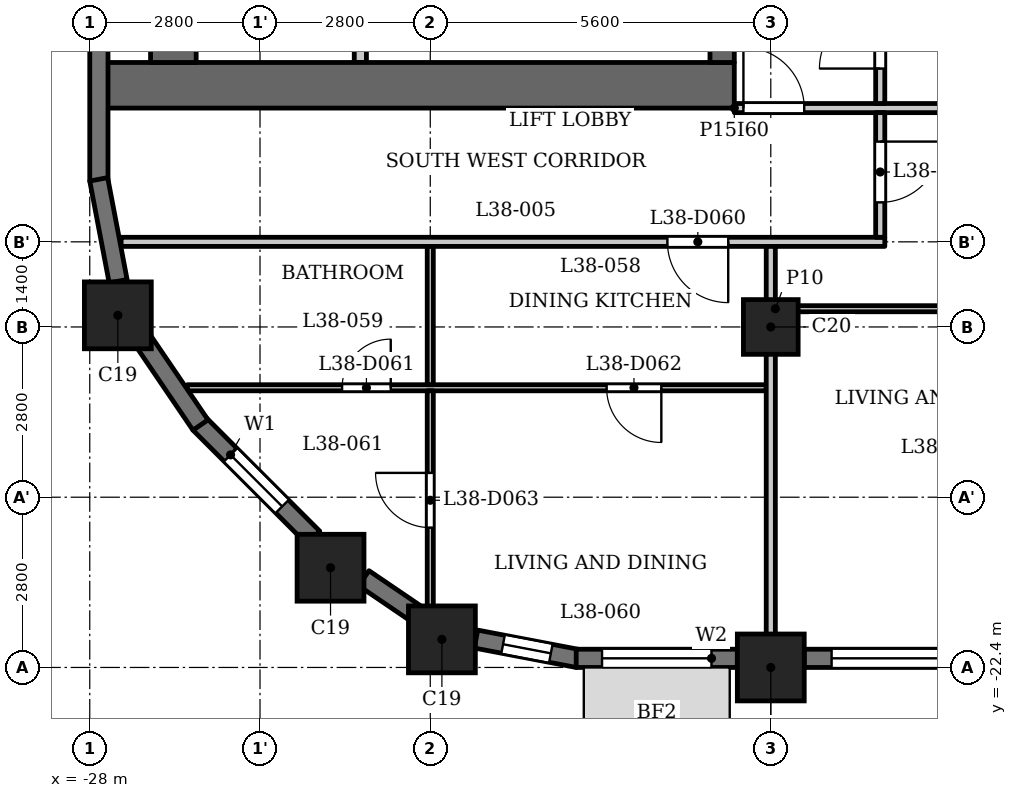
"""IFC4 building model, lengths in metres.
Left out: names, types, materials, properties, quantities, classifications, styles, units other than length and angle.
Written with IfcOpenShell. Run it as: python <this file> out.ifc"""

import sys

from ifc_helpers import new_model, si_unit, direction, frame, frame_2d, origin, origin_2d, place, context, subcontext, project, spatial, rectangle, extrude, element, fill, save


model = new_model("IFC4")
c1 = context("Model", 3, precision=1e-05, world=origin(), true_north=direction((0.0, 1.0)))
c2 = subcontext(c1, "Body", "Model", "MODEL_VIEW")
j1 = project(units=[si_unit("LENGTHUNIT", "METRE"), si_unit("PLANEANGLEUNIT", "RADIAN")], contexts=[c1])
p1 = place(None, origin())
s1 = spatial("IfcSite", under=j1, at=p1, CompositionType="ELEMENT")
p2 = place(p1, origin())
s2 = spatial("IfcBuilding", under=s1, at=p2, CompositionType="ELEMENT")
p3 = place(p2, frame((0.0, 0.0, 150.1)))
s3 = spatial("IfcBuildingStorey", under=s2, at=p3, CompositionType="ELEMENT", Elevation=150.1)
for number, where, z_axis, x_axis in (
    (1, (-22.209, -21.938, 0.0), (0.0, 0.0, 1.0), (1.0, 0.0, 0.0)),
    (2, (-16.8, -22.4, 0.0), (0.0, 0.0, 1.0), (1.0, 0.0, 0.0)),
    (3, (-27.538, -16.609, 0.0), (0.0, 0.0, 1.0), (1.0, 0.0, 0.0)),
    (4, (-24.04, -20.76, 0.0), (0.0, 0.0, 1.0), (1.0, 0.0, 0.0)),
):
    element("IfcColumn", number, at=place(p3, frame(where, z_axis=z_axis, x_axis=x_axis)), inside=s3, PredefinedType="COLUMN", context=c2, shape_type="SweptSolid", body=[
        extrude(rectangle(XDim=1.1, YDim=1.1, at=origin_2d()), origin(), (0.0, 0.0, 1.0), 3.5),
    ])
p4 = place(p3, frame((-16.8, -16.8, 0.0), z_axis=(0.0, 0.0, 1.0), x_axis=(1.0, 0.0, 0.0)))
e5 = element("IfcColumn", 5, at=p4, inside=s3, PredefinedType="COLUMN", context=c2, shape_type="SweptSolid", body=[
    extrude(rectangle(XDim=0.9, YDim=0.9, at=origin_2d()), origin(), (0.0, 0.0, 1.0), 3.5),
])
p5 = place(p3, frame((-26.197, -18.391, 0.0), z_axis=(0.0, 0.0, 1.0), x_axis=(0.707060717099, -0.707152842274, 0.0)))
e6 = element("IfcWall", 6, at=p5, inside=s3, PredefinedType="SOLIDWALL", context=c2, shape_type="SweptSolid", body=[
    extrude(rectangle(XDim=2.65, YDim=0.3, at=frame_2d((1.325, 0.0))), origin(), (0.0, 0.0, 1.0), 2.45),
])
p6 = place(p5, frame((0.725, 0.0, 0.6)))
e7 = element("IfcOpeningElement", 7, at=p6, cuts=e6, PredefinedType="OPENING", context=c2, shape_type="SweptSolid", body=[
    extrude(rectangle(XDim=1.2, YDim=1.55, at=frame_2d((0.6, 0.775))), frame((0.0, 0.16, 0.0), z_axis=(0.0, -1.0, 0.0), x_axis=(1.0, 0.0, 0.0)), (0.0, 0.0, 1.0), 0.32),
])
p7 = place(p3, frame((-23.492, -20.932, 0.0), z_axis=(0.0, 0.0, 1.0), x_axis=(0.826993959827, -0.562210806023, 0.0)))
e8 = element("IfcWall", 8, at=p7, inside=s3, PredefinedType="SOLIDWALL", context=c2, shape_type="SweptSolid", body=[
    extrude(rectangle(XDim=1.077, YDim=0.3, at=frame_2d((0.539, 0.0))), origin(), (0.0, 0.0, 1.0), 3.2),
])
p8 = place(p3, frame((-21.648, -21.933, 0.0), z_axis=(0.0, 0.0, 1.0), x_axis=(0.982297206936, -0.187329114784, 0.0)))
e9 = element("IfcWall", 9, at=p8, inside=s3, PredefinedType="SOLIDWALL", context=c2, shape_type="SweptSolid", body=[
    extrude(rectangle(XDim=1.706, YDim=0.3, at=frame_2d((0.853, 0.0))), origin(), (0.0, 0.0, 1.0), 2.45),
])
p9 = place(p8, frame((0.453, 0.0, 0.6)))
e10 = element("IfcOpeningElement", 10, at=p9, cuts=e9, PredefinedType="OPENING", context=c2, shape_type="SweptSolid", body=[
    extrude(rectangle(XDim=0.8, YDim=1.55, at=frame_2d((0.4, 0.775))), frame((0.0, 0.16, 0.0), z_axis=(0.0, -1.0, 0.0), x_axis=(1.0, 0.0, 0.0)), (0.0, 0.0, 1.0), 0.32),
])
p10 = place(p3, frame((-20.0, -22.25, 0.0), z_axis=(0.0, 0.0, 1.0), x_axis=(1.0, 0.0, 0.0)))
e11 = element("IfcWall", 11, at=p10, inside=s3, PredefinedType="SOLIDWALL", context=c2, shape_type="SweptSolid", body=[
    extrude(rectangle(XDim=2.65, YDim=0.3, at=frame_2d((1.325, 0.0))), origin(), (0.0, 0.0, 1.0), 2.45),
])
p11 = place(p10, frame((0.425, 0.0, 0.9)))
e12 = element("IfcOpeningElement", 12, at=p11, cuts=e11, PredefinedType="OPENING", context=c2, shape_type="SweptSolid", body=[
    extrude(rectangle(XDim=1.8, YDim=1.25, at=frame_2d((0.9, 0.625))), frame((0.0, 0.16, 0.0), z_axis=(0.0, -1.0, 0.0), x_axis=(1.0, 0.0, 0.0)), (0.0, 0.0, 1.0), 0.32),
])
p12 = place(p3, frame((-16.25, -22.25, 0.0), z_axis=(0.0, 0.0, 1.0), x_axis=(1.0, 0.0, 0.0)))
e13 = element("IfcWall", 13, at=p12, inside=s3, PredefinedType="SOLIDWALL", context=c2, shape_type="SweptSolid", body=[
    extrude(rectangle(XDim=4.5, YDim=0.3, at=frame_2d((2.25, 0.0))), origin(), (0.0, 0.0, 1.0), 2.45),
])
p13 = place(p12, frame((0.45, 0.0, 1.2)))
e14 = element("IfcOpeningElement", 14, at=p13, cuts=e13, PredefinedType="OPENING", context=c2, shape_type="SweptSolid", body=[
    extrude(rectangle(XDim=3.6, YDim=0.95, at=frame_2d((1.8, 0.475))), frame((0.0, 0.16, 0.0), z_axis=(0.0, -1.0, 0.0), x_axis=(1.0, 0.0, 0.0)), (0.0, 0.0, 1.0), 0.32),
])
p14 = place(p3, frame((-27.85, -11.75, 0.0), z_axis=(0.0, 0.0, 1.0), x_axis=(0.0, -1.0, 0.0)))
e15 = element("IfcWall", 15, at=p14, inside=s3, PredefinedType="SOLIDWALL", context=c2, shape_type="SweptSolid", body=[
    extrude(rectangle(XDim=2.65, YDim=0.3, at=frame_2d((1.325, 0.0))), origin(), (0.0, 0.0, 1.0), 2.45),
])
p15 = place(p3, frame((-27.853, -14.372, 0.0), z_axis=(0.0, 0.0, 1.0), x_axis=(0.187302784601, -0.982302227871, 0.0)))
e16 = element("IfcWall", 16, at=p15, inside=s3, PredefinedType="SOLIDWALL", context=c2, shape_type="SweptSolid", body=[
    extrude(rectangle(XDim=1.706, YDim=0.3, at=frame_2d((0.853, 0.0))), origin(), (0.0, 0.0, 1.0), 2.45),
])
p16 = place(p3, frame((-27.138, -17.002, 0.0), z_axis=(0.0, 0.0, 1.0), x_axis=(0.562075160946, -0.827086158419, 0.0)))
e17 = element("IfcWall", 17, at=p16, inside=s3, PredefinedType="SOLIDWALL", context=c2, shape_type="SweptSolid", body=[
    extrude(rectangle(XDim=1.706, YDim=0.3, at=frame_2d((0.853, 0.0))), origin(), (0.0, 0.0, 1.0), 2.45),
])
p17 = place(p3, frame((-17.4, -12.825, 0.0), z_axis=(0.0, 0.0, 1.0), x_axis=(-1.0, 0.0, 0.0)))
e18 = element("IfcWall", 18, at=p17, inside=s3, PredefinedType="SHEAR", context=c2, shape_type="SweptSolid", body=[
    extrude(rectangle(XDim=10.4, YDim=0.75, at=frame_2d((5.2, 0.0))), origin(), (0.0, 0.0, 1.0), 3.2),
])
p18 = place(p3, frame((-17.6, -12.45, 0.0), z_axis=(0.0, 0.0, 1.0), x_axis=(0.0, 1.0, 0.0)))
e19 = element("IfcWall", 19, at=p18, inside=s3, PredefinedType="SHEAR", context=c2, shape_type="SweptSolid", body=[
    extrude(rectangle(XDim=24.9, YDim=0.4, at=frame_2d((12.45, 0.0))), origin(), (0.0, 0.0, 1.0), 3.2),
])
p19 = place(p18, frame((6.325, 0.0, 0.0)))
e20 = element("IfcOpeningElement", 20, at=p19, cuts=e19, PredefinedType="OPENING", context=c2, shape_type="SweptSolid", body=[
    extrude(rectangle(XDim=0.9, YDim=2.1, at=frame_2d((0.45, 1.05))), frame((0.0, 0.21, 0.0), z_axis=(0.0, -1.0, 0.0), x_axis=(1.0, 0.0, 0.0)), (0.0, 0.0, 1.0), 0.42),
])
p20 = place(p18, frame((9.925, 0.0, 0.0)))
e21 = element("IfcOpeningElement", 21, at=p20, cuts=e19, PredefinedType="OPENING", context=c2, shape_type="SweptSolid", body=[
    extrude(rectangle(XDim=0.9, YDim=2.1, at=frame_2d((0.45, 1.05))), frame((0.0, 0.21, 0.0), z_axis=(0.0, -1.0, 0.0), x_axis=(1.0, 0.0, 0.0)), (0.0, 0.0, 1.0), 0.42),
])
p21 = place(p18, frame((15.6, 0.0, 0.0)))
e22 = element("IfcOpeningElement", 22, at=p21, cuts=e19, PredefinedType="OPENING", context=c2, shape_type="SweptSolid", body=[
    extrude(rectangle(XDim=1.1, YDim=2.1, at=frame_2d((0.55, 1.05))), frame((0.0, 0.21, 0.0), z_axis=(0.0, -1.0, 0.0), x_axis=(1.0, 0.0, 0.0)), (0.0, 0.0, 1.0), 0.42),
])
p22 = place(p18, frame((18.0, 0.0, 0.0)))
e23 = element("IfcOpeningElement", 23, at=p22, cuts=e19, PredefinedType="OPENING", context=c2, shape_type="SweptSolid", body=[
    extrude(rectangle(XDim=1.1, YDim=2.1, at=frame_2d((0.55, 1.05))), frame((0.0, 0.21, 0.0), z_axis=(0.0, -1.0, 0.0), x_axis=(1.0, 0.0, 0.0)), (0.0, 0.0, 1.0), 0.42),
])
p23 = place(p18, frame((23.025, 0.0, 0.0)))
e24 = element("IfcOpeningElement", 24, at=p23, cuts=e19, PredefinedType="OPENING", context=c2, shape_type="SweptSolid", body=[
    extrude(rectangle(XDim=1.1, YDim=2.1, at=frame_2d((0.55, 1.05))), frame((0.0, 0.21, 0.0), z_axis=(0.0, -1.0, 0.0), x_axis=(1.0, 0.0, 0.0)), (0.0, 0.0, 1.0), 0.42),
])
p24 = place(p18, frame((0.775, 0.0, 0.0)))
e25 = element("IfcOpeningElement", 25, at=p24, cuts=e19, PredefinedType="OPENING", context=c2, shape_type="SweptSolid", body=[
    extrude(rectangle(XDim=1.1, YDim=2.1, at=frame_2d((0.55, 1.05))), frame((0.0, 0.21, 0.0), z_axis=(0.0, -1.0, 0.0), x_axis=(1.0, 0.0, 0.0)), (0.0, 0.0, 1.0), 0.42),
])
p25 = place(p18, frame((12.925, 0.0, 0.0)))
e26 = element("IfcOpeningElement", 26, at=p25, cuts=e19, PredefinedType="OPENING", context=c2, shape_type="SweptSolid", body=[
    extrude(rectangle(XDim=1.8, YDim=2.1, at=frame_2d((0.9, 1.05))), frame((0.0, 0.21, 0.0), z_axis=(0.0, -1.0, 0.0), x_axis=(1.0, 0.0, 0.0)), (0.0, 0.0, 1.0), 0.42),
])
p26 = place(p3, frame((-26.625, -12.45, 0.0), z_axis=(0.0, 0.0, 1.0), x_axis=(0.0, 1.0, 0.0)))
e27 = element("IfcWall", 27, at=p26, inside=s3, PredefinedType="SHEAR", context=c2, shape_type="SweptSolid", body=[
    extrude(rectangle(XDim=24.9, YDim=0.75, at=frame_2d((12.45, 0.0))), origin(), (0.0, 0.0, 1.0), 3.2),
])
p27 = place(p3, frame((-23.55, -12.45, 0.0), z_axis=(0.0, 0.0, 1.0), x_axis=(0.0, 1.0, 0.0)))
e28 = element("IfcWall", 28, at=p27, inside=s3, PredefinedType="PARTITIONING", context=c2, shape_type="SweptSolid", body=[
    extrude(rectangle(XDim=2.65, YDim=0.2, at=frame_2d((1.325, 0.0))), origin(), (0.0, 0.0, 1.0), 3.2),
])
p28 = place(p27, frame((0.875, 0.0, 0.0)))
e29 = element("IfcOpeningElement", 29, at=p28, cuts=e28, PredefinedType="OPENING", context=c2, shape_type="SweptSolid", body=[
    extrude(rectangle(XDim=0.9, YDim=2.1, at=frame_2d((0.45, 1.05))), frame((0.0, 0.11, 0.0), z_axis=(0.0, -1.0, 0.0), x_axis=(1.0, 0.0, 0.0)), (0.0, 0.0, 1.0), 0.22),
])
p29 = place(p3, frame((-26.394, -17.8, 0.0), z_axis=(0.0, 0.0, 1.0), x_axis=(1.0, 0.0, 0.0)))
e30 = element("IfcWall", 30, at=p29, inside=s3, PredefinedType="PARTITIONING", context=c2, shape_type="SweptSolid", body=[
    extrude(rectangle(XDim=9.519, YDim=0.1, at=frame_2d((4.76, 0.0))), origin(), (0.0, 0.0, 1.0), 3.2),
])
p30 = place(p29, frame((2.544, 0.0, 0.0)))
e31 = element("IfcOpeningElement", 31, at=p30, cuts=e30, PredefinedType="OPENING", context=c2, shape_type="SweptSolid", body=[
    extrude(rectangle(XDim=0.8, YDim=2.1, at=frame_2d((0.4, 1.05))), frame((0.0, 0.06, 0.0), z_axis=(0.0, -1.0, 0.0), x_axis=(1.0, 0.0, 0.0)), (0.0, 0.0, 1.0), 0.12),
])
p31 = place(p29, frame((6.894, 0.0, 0.0)))
e32 = element("IfcOpeningElement", 32, at=p31, cuts=e30, PredefinedType="OPENING", context=c2, shape_type="SweptSolid", body=[
    extrude(rectangle(XDim=0.9, YDim=2.1, at=frame_2d((0.45, 1.05))), frame((0.0, 0.06, 0.0), z_axis=(0.0, -1.0, 0.0), x_axis=(1.0, 0.0, 0.0)), (0.0, 0.0, 1.0), 0.12),
])
p32 = place(p3, frame((-16.725, -16.5, 0.0), z_axis=(0.0, 0.0, 1.0), x_axis=(1.0, 0.0, 0.0)))
e33 = element("IfcWall", 33, at=p32, inside=s3, PredefinedType="PARTITIONING", context=c2, shape_type="SweptSolid", body=[
    extrude(rectangle(XDim=33.45, YDim=0.1, at=frame_2d((16.725, 0.0))), origin(), (0.0, 0.0, 1.0), 3.2),
])
p33 = place(p32, frame((9.675, 0.0, 0.0)))
e34 = element("IfcOpeningElement", 34, at=p33, cuts=e33, PredefinedType="OPENING", context=c2, shape_type="SweptSolid", body=[
    extrude(rectangle(XDim=0.8, YDim=2.1, at=frame_2d((0.4, 1.05))), frame((0.0, 0.06, 0.0), z_axis=(0.0, -1.0, 0.0), x_axis=(1.0, 0.0, 0.0)), (0.0, 0.0, 1.0), 0.12),
])
p34 = place(p32, frame((4.075, 0.0, 0.0)))
e35 = element("IfcOpeningElement", 35, at=p34, cuts=e33, PredefinedType="OPENING", context=c2, shape_type="SweptSolid", body=[
    extrude(rectangle(XDim=0.9, YDim=2.1, at=frame_2d((0.45, 1.05))), frame((0.0, 0.06, 0.0), z_axis=(0.0, -1.0, 0.0), x_axis=(1.0, 0.0, 0.0)), (0.0, 0.0, 1.0), 0.12),
])
p35 = place(p32, frame((20.875, 0.0, 0.0)))
e36 = element("IfcOpeningElement", 36, at=p35, cuts=e33, PredefinedType="OPENING", context=c2, shape_type="SweptSolid", body=[
    extrude(rectangle(XDim=0.8, YDim=2.1, at=frame_2d((0.4, 1.05))), frame((0.0, 0.06, 0.0), z_axis=(0.0, -1.0, 0.0), x_axis=(1.0, 0.0, 0.0)), (0.0, 0.0, 1.0), 0.12),
])
p36 = place(p32, frame((15.275, 0.0, 0.0)))
e37 = element("IfcOpeningElement", 37, at=p36, cuts=e33, PredefinedType="OPENING", context=c2, shape_type="SweptSolid", body=[
    extrude(rectangle(XDim=0.9, YDim=2.1, at=frame_2d((0.45, 1.05))), frame((0.0, 0.06, 0.0), z_axis=(0.0, -1.0, 0.0), x_axis=(1.0, 0.0, 0.0)), (0.0, 0.0, 1.0), 0.12),
])
p37 = place(p32, frame((26.475, 0.0, 0.0)))
e38 = element("IfcOpeningElement", 38, at=p37, cuts=e33, PredefinedType="OPENING", context=c2, shape_type="SweptSolid", body=[
    extrude(rectangle(XDim=0.8, YDim=2.1, at=frame_2d((0.4, 1.05))), frame((0.0, 0.06, 0.0), z_axis=(0.0, -1.0, 0.0), x_axis=(1.0, 0.0, 0.0)), (0.0, 0.0, 1.0), 0.12),
])
p38 = place(p32, frame((30.575, 0.0, 0.0)))
e39 = element("IfcOpeningElement", 39, at=p38, cuts=e33, PredefinedType="OPENING", context=c2, shape_type="SweptSolid", body=[
    extrude(rectangle(XDim=0.9, YDim=2.1, at=frame_2d((0.45, 1.05))), frame((0.0, 0.06, 0.0), z_axis=(0.0, -1.0, 0.0), x_axis=(1.0, 0.0, 0.0)), (0.0, 0.0, 1.0), 0.12),
])
p39 = place(p3, frame((-27.484, -15.4, 0.0), z_axis=(0.0, 0.0, 1.0), x_axis=(1.0, 0.0, 0.0)))
e40 = element("IfcWall", 40, at=p39, inside=s3, PredefinedType="PARTITIONING", context=c2, shape_type="SweptSolid", body=[
    extrude(rectangle(XDim=12.559, YDim=0.15, at=frame_2d((6.279, 0.0))), origin(), (0.0, 0.0, 1.0), 3.2),
])
p40 = place(p39, frame((8.984, 0.0, 0.0)))
e41 = element("IfcOpeningElement", 41, at=p40, cuts=e40, PredefinedType="OPENING", context=c2, shape_type="SweptSolid", body=[
    extrude(rectangle(XDim=1.0, YDim=2.1, at=frame_2d((0.5, 1.05))), frame((0.0, 0.085, 0.0), z_axis=(0.0, -1.0, 0.0), x_axis=(1.0, 0.0, 0.0)), (0.0, 0.0, 1.0), 0.17),
])
p41 = place(p3, frame((-17.4, -13.2, 0.0), z_axis=(0.0, 0.0, 1.0), x_axis=(1.0, 0.0, 0.0)))
e42 = element("IfcWall", 42, at=p41, inside=s3, PredefinedType="PARTITIONING", context=c2, shape_type="SweptSolid", body=[
    extrude(rectangle(XDim=34.8, YDim=0.15, at=frame_2d((17.4, 0.0))), origin(), (0.0, 0.0, 1.0), 3.2),
])
p42 = place(p41, frame((0.15, 0.0, 0.0)))
e43 = element("IfcOpeningElement", 43, at=p42, cuts=e42, PredefinedType="OPENING", context=c2, shape_type="SweptSolid", body=[
    extrude(rectangle(XDim=1.0, YDim=2.1, at=frame_2d((0.5, 1.05))), frame((0.0, 0.085, 0.0), z_axis=(0.0, -1.0, 0.0), x_axis=(1.0, 0.0, 0.0)), (0.0, 0.0, 1.0), 0.17),
])
p43 = place(p41, frame((33.55, 0.0, 0.0)))
e44 = element("IfcOpeningElement", 44, at=p43, cuts=e42, PredefinedType="OPENING", context=c2, shape_type="SweptSolid", body=[
    extrude(rectangle(XDim=1.0, YDim=2.1, at=frame_2d((0.5, 1.05))), frame((0.0, 0.085, 0.0), z_axis=(0.0, -1.0, 0.0), x_axis=(1.0, 0.0, 0.0)), (0.0, 0.0, 1.0), 0.17),
])
p44 = place(p41, frame((15.7, 0.0, 0.0)))
e45 = element("IfcOpeningElement", 45, at=p44, cuts=e42, PredefinedType="OPENING", context=c2, shape_type="SweptSolid", body=[
    extrude(rectangle(XDim=1.0, YDim=2.1, at=frame_2d((0.5, 1.05))), frame((0.0, 0.085, 0.0), z_axis=(0.0, -1.0, 0.0), x_axis=(1.0, 0.0, 0.0)), (0.0, 0.0, 1.0), 0.17),
])
p45 = place(p3, frame((-22.4, -21.72, 0.0), z_axis=(0.0, 0.0, 1.0), x_axis=(0.0, 1.0, 0.0)))
e46 = element("IfcWall", 46, at=p45, inside=s3, PredefinedType="PARTITIONING", context=c2, shape_type="SweptSolid", body=[
    extrude(rectangle(XDim=3.87, YDim=0.1, at=frame_2d((1.935, 0.0))), origin(), (0.0, 0.0, 1.0), 3.2),
])
p46 = place(p45, frame((1.62, 0.0, 0.0)))
e47 = element("IfcOpeningElement", 47, at=p46, cuts=e46, PredefinedType="OPENING", context=c2, shape_type="SweptSolid", body=[
    extrude(rectangle(XDim=0.9, YDim=2.1, at=frame_2d((0.45, 1.05))), frame((0.0, 0.06, 0.0), z_axis=(0.0, -1.0, 0.0), x_axis=(1.0, 0.0, 0.0)), (0.0, 0.0, 1.0), 0.12),
])
p47 = place(p3, frame((-22.4, -17.75, 0.0), z_axis=(0.0, 0.0, 1.0), x_axis=(0.0, 1.0, 0.0)))
e48 = element("IfcWall", 48, at=p47, inside=s3, PredefinedType="PARTITIONING", context=c2, shape_type="SweptSolid", body=[
    extrude(rectangle(XDim=2.275, YDim=0.1, at=frame_2d((1.137, 0.0))), origin(), (0.0, 0.0, 1.0), 3.2),
])
p48 = place(p3, frame((-16.8, -22.93, 0.0), z_axis=(0.0, 0.0, 1.0), x_axis=(0.0, 1.0, 0.0)))
e49 = element("IfcWall", 49, at=p48, inside=s3, PredefinedType="PARTITIONING", context=c2, shape_type="SweptSolid", body=[
    extrude(rectangle(XDim=7.455, YDim=0.15, at=frame_2d((3.728, 0.0))), origin(), (0.0, 0.0, 1.0), 3.2),
])
p49 = place(p3, frame((-15.0, -15.325, 0.0), z_axis=(0.0, 0.0, 1.0), x_axis=(0.0, 1.0, 0.0)))
e50 = element("IfcWall", 50, at=p49, inside=s3, PredefinedType="PARTITIONING", context=c2, shape_type="SweptSolid", body=[
    extrude(rectangle(XDim=2.05, YDim=0.15, at=frame_2d((1.025, 0.0))), origin(), (0.0, 0.0, 1.0), 3.2),
])
p50 = place(p49, frame((0.574, 0.0, 0.0)))
e51 = element("IfcOpeningElement", 51, at=p50, cuts=e50, PredefinedType="OPENING", context=c2, shape_type="SweptSolid", body=[
    extrude(rectangle(XDim=1.0, YDim=2.1, at=frame_2d((0.5, 1.05))), frame((0.0, 0.085, 0.0), z_axis=(0.0, -1.0, 0.0), x_axis=(1.0, 0.0, 0.0)), (0.0, 0.0, 1.0), 0.17),
])
p51 = place(p3, frame((-15.0, -13.125, 0.0), z_axis=(0.0, 0.0, 1.0), x_axis=(0.0, 1.0, 0.0)))
e52 = element("IfcWall", 52, at=p51, inside=s3, PredefinedType="PARTITIONING", context=c2, shape_type="SweptSolid", body=[
    extrude(rectangle(XDim=6.356, YDim=0.15, at=frame_2d((3.178, 0.0))), origin(), (0.0, 0.0, 1.0), 3.2),
])
p52 = place(p51, frame((0.575, 0.0, 0.0)))
e53 = element("IfcOpeningElement", 53, at=p52, cuts=e52, PredefinedType="OPENING", context=c2, shape_type="SweptSolid", body=[
    extrude(rectangle(XDim=1.0, YDim=2.1, at=frame_2d((0.5, 1.05))), frame((0.0, 0.085, 0.0), z_axis=(0.0, -1.0, 0.0), x_axis=(1.0, 0.0, 0.0)), (0.0, 0.0, 1.0), 0.17),
])
p53 = place(p52, origin())
e54 = element("IfcDoor", 54, at=p53, inside=s3, OperationType="SINGLE_SWING_RIGHT", PredefinedType="DOOR", context=c2, shape_type="SweptSolid", body=[
    extrude(rectangle(XDim=1.0, YDim=2.1, at=frame_2d((0.5, 1.05))), frame((0.0, 0.025, 0.0), z_axis=(0.0, -1.0, 0.0), x_axis=(1.0, 0.0, 0.0)), (0.0, 0.0, 1.0), 0.05),
])
fill(e53, e54)
p54 = place(p42, origin())
e55 = element("IfcDoor", 55, at=p54, inside=s3, OperationType="SINGLE_SWING_RIGHT", PredefinedType="DOOR", context=c2, shape_type="SweptSolid", body=[
    extrude(rectangle(XDim=1.0, YDim=2.1, at=frame_2d((0.5, 1.05))), frame((0.0, 0.025, 0.0), z_axis=(0.0, -1.0, 0.0), x_axis=(1.0, 0.0, 0.0)), (0.0, 0.0, 1.0), 0.05),
])
fill(e43, e55)
p55 = place(p50, origin())
e56 = element("IfcDoor", 56, at=p55, inside=s3, OperationType="SINGLE_SWING_RIGHT", PredefinedType="DOOR", context=c2, shape_type="SweptSolid", body=[
    extrude(rectangle(XDim=1.0, YDim=2.1, at=frame_2d((0.5, 1.05))), frame((0.0, 0.025, 0.0), z_axis=(0.0, -1.0, 0.0), x_axis=(1.0, 0.0, 0.0)), (0.0, 0.0, 1.0), 0.05),
])
fill(e51, e56)
p56 = place(p40, origin())
e57 = element("IfcDoor", 57, at=p56, inside=s3, OperationType="SINGLE_SWING_RIGHT", PredefinedType="DOOR", context=c2, shape_type="SweptSolid", body=[
    extrude(rectangle(XDim=1.0, YDim=2.1, at=frame_2d((0.5, 1.05))), frame((0.0, 0.025, 0.0), z_axis=(0.0, -1.0, 0.0), x_axis=(1.0, 0.0, 0.0)), (0.0, 0.0, 1.0), 0.05),
])
fill(e41, e57)
p57 = place(p30, origin())
e58 = element("IfcDoor", 58, at=p57, inside=s3, OperationType="SINGLE_SWING_LEFT", PredefinedType="DOOR", context=c2, shape_type="SweptSolid", body=[
    extrude(rectangle(XDim=0.8, YDim=2.1, at=frame_2d((0.4, 1.05))), frame((0.0, 0.025, 0.0), z_axis=(0.0, -1.0, 0.0), x_axis=(1.0, 0.0, 0.0)), (0.0, 0.0, 1.0), 0.05),
])
fill(e31, e58)
p58 = place(p31, origin())
e59 = element("IfcDoor", 59, at=p58, inside=s3, OperationType="SINGLE_SWING_RIGHT", PredefinedType="DOOR", context=c2, shape_type="SweptSolid", body=[
    extrude(rectangle(XDim=0.9, YDim=2.1, at=frame_2d((0.45, 1.05))), frame((0.0, 0.025, 0.0), z_axis=(0.0, -1.0, 0.0), x_axis=(1.0, 0.0, 0.0)), (0.0, 0.0, 1.0), 0.05),
])
fill(e32, e59)
p59 = place(p46, origin())
e60 = element("IfcDoor", 60, at=p59, inside=s3, OperationType="SINGLE_SWING_LEFT", PredefinedType="DOOR", context=c2, shape_type="SweptSolid", body=[
    extrude(rectangle(XDim=0.9, YDim=2.1, at=frame_2d((0.45, 1.05))), frame((0.0, 0.025, 0.0), z_axis=(0.0, -1.0, 0.0), x_axis=(1.0, 0.0, 0.0)), (0.0, 0.0, 1.0), 0.05),
])
fill(e47, e60)
p60 = place(p6, origin())
e61 = element("IfcWindow", 61, at=p60, inside=s3, PartitioningType="SINGLE_PANEL", PredefinedType="WINDOW", context=c2, shape_type="SweptSolid", body=[
    extrude(rectangle(XDim=1.2, YDim=1.55, at=frame_2d((0.6, 0.775))), frame((0.0, 0.03, 0.0), z_axis=(0.0, -1.0, 0.0), x_axis=(1.0, 0.0, 0.0)), (0.0, 0.0, 1.0), 0.06),
])
fill(e7, e61)
p61 = place(p9, origin())
e62 = element("IfcWindow", 62, at=p61, inside=s3, PartitioningType="SINGLE_PANEL", PredefinedType="WINDOW", context=c2, shape_type="SweptSolid", body=[
    extrude(rectangle(XDim=0.8, YDim=1.55, at=frame_2d((0.4, 0.775))), frame((0.0, 0.03, 0.0), z_axis=(0.0, -1.0, 0.0), x_axis=(1.0, 0.0, 0.0)), (0.0, 0.0, 1.0), 0.06),
])
fill(e10, e62)
p62 = place(p11, origin())
e63 = element("IfcWindow", 63, at=p62, inside=s3, PartitioningType="SINGLE_PANEL", PredefinedType="WINDOW", context=c2, shape_type="SweptSolid", body=[
    extrude(rectangle(XDim=1.8, YDim=1.25, at=frame_2d((0.9, 0.625))), frame((0.0, 0.03, 0.0), z_axis=(0.0, -1.0, 0.0), x_axis=(1.0, 0.0, 0.0)), (0.0, 0.0, 1.0), 0.06),
])
fill(e12, e63)
p63 = place(p13, origin())
e64 = element("IfcWindow", 64, at=p63, inside=s3, PartitioningType="SINGLE_PANEL", PredefinedType="WINDOW", context=c2, shape_type="SweptSolid", body=[
    extrude(rectangle(XDim=3.6, YDim=0.95, at=frame_2d((1.8, 0.475))), frame((0.0, 0.03, 0.0), z_axis=(0.0, -1.0, 0.0), x_axis=(1.0, 0.0, 0.0)), (0.0, 0.0, 1.0), 0.06),
])
fill(e14, e64)
save(model, sys.argv[1])
